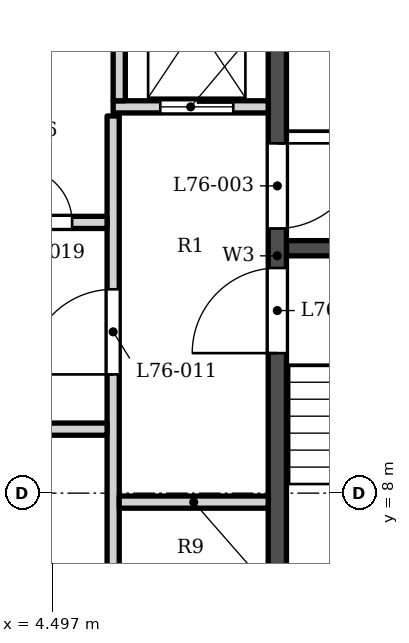
"""IFC4 building model, lengths in metres.
Left out: names, types, materials, properties, quantities, classifications, styles, units other than length and angle.
Written with IfcOpenShell. Run it as: python <this file> out.ifc"""

import sys

from ifc_helpers import new_model, si_unit, direction, frame, frame_2d, origin, place, context, subcontext, project, spatial, rectangle, extrude, element, fill, save


model = new_model("IFC4")
c1 = context("Model", 3, precision=1e-05, world=origin(), true_north=direction((0.0, 1.0)))
c2 = subcontext(c1, "Body", "Model", "MODEL_VIEW")
j1 = project(units=[si_unit("LENGTHUNIT", "METRE"), si_unit("PLANEANGLEUNIT", "RADIAN")], contexts=[c1])
p1 = place(None, origin())
s1 = spatial("IfcSite", under=j1, at=p1, CompositionType="ELEMENT")
p2 = place(p1, origin())
s2 = spatial("IfcBuilding", under=s1, at=p2, CompositionType="ELEMENT")
p3 = place(p2, frame((0.0, 0.0, 325.5)))
s3 = spatial("IfcBuildingStorey", under=s2, at=p3, CompositionType="ELEMENT", Elevation=325.5)
p4 = place(p3, frame((8.2, 5.253, 0.0), z_axis=(0.0, 0.0, 1.0), x_axis=(0.0, 1.0, 0.0)))
e1 = element("IfcWall", 1, at=p4, inside=s3, PredefinedType="SHEAR", context=c2, shape_type="SweptSolid", body=[
    extrude(rectangle(XDim=13.3, YDim=0.3, at=frame_2d((6.65, 0.0))), origin(), (0.0, 0.0, 1.0), 5.0),
])
p5 = place(p4, frame((7.1, 0.0, 0.0)))
e2 = element("IfcOpeningElement", 2, at=p5, cuts=e1, PredefinedType="OPENING", context=c2, shape_type="SweptSolid", body=[
    extrude(rectangle(XDim=1.4, YDim=2.1, at=frame_2d((0.7, 1.05))), frame((0.0, 0.16, 0.0), z_axis=(0.0, -1.0, 0.0), x_axis=(1.0, 0.0, 0.0)), (0.0, 0.0, 1.0), 0.32),
])
p6 = place(p4, frame((5.05, 0.0, 0.0)))
e3 = element("IfcOpeningElement", 3, at=p6, cuts=e1, PredefinedType="OPENING", context=c2, shape_type="SweptSolid", body=[
    extrude(rectangle(XDim=1.4, YDim=2.1, at=frame_2d((0.7, 1.05))), frame((0.0, 0.16, 0.0), z_axis=(0.0, -1.0, 0.0), x_axis=(1.0, 0.0, 0.0)), (0.0, 0.0, 1.0), 0.32),
])
p7 = place(p3, frame((8.35, 12.028, 0.0), z_axis=(0.0, 0.0, 1.0), x_axis=(1.0, 0.0, 0.0)))
e4 = element("IfcWall", 4, at=p7, inside=s3, PredefinedType="SHEAR", context=c2, shape_type="SweptSolid", body=[
    extrude(rectangle(XDim=3.75, YDim=0.25, at=frame_2d((1.875, 0.0))), origin(), (0.0, 0.0, 1.0), 5.0),
])
p8 = place(p3, frame((5.5, 6.353, 0.0), z_axis=(0.0, 0.0, 1.0), x_axis=(0.0, 1.0, 0.0)))
e5 = element("IfcWall", 5, at=p8, inside=s3, PredefinedType="SOLIDWALL", context=c2, shape_type="SweptSolid", body=[
    extrude(rectangle(XDim=7.85, YDim=0.2, at=frame_2d((3.925, 0.0))), origin(), (0.0, 0.0, 1.0), 4.8),
])
p9 = place(p8, frame((3.6, 0.0, 0.0)))
e6 = element("IfcOpeningElement", 6, at=p9, cuts=e5, PredefinedType="OPENING", context=c2, shape_type="SweptSolid", body=[
    extrude(rectangle(XDim=1.4, YDim=2.1, at=frame_2d((0.7, 1.05))), frame((0.0, 0.11, 0.0), z_axis=(0.0, -1.0, 0.0), x_axis=(1.0, 0.0, 0.0)), (0.0, 0.0, 1.0), 0.22),
])
p10 = place(p3, frame((5.6, 7.853, 0.0), z_axis=(0.0, 0.0, 1.0), x_axis=(1.0, 0.0, 0.0)))
e7 = element("IfcWall", 7, at=p10, inside=s3, PredefinedType="SOLIDWALL", context=c2, shape_type="SweptSolid", body=[
    extrude(rectangle(XDim=2.45, YDim=0.2, at=frame_2d((1.225, 0.0))), origin(), (0.0, 0.0, 1.0), 4.8),
])
p11 = place(p3, frame((1.1, 9.052, 0.0), z_axis=(0.0, 0.0, 1.0), x_axis=(1.0, 0.0, 0.0)))
e8 = element("IfcWall", 8, at=p11, inside=s3, PredefinedType="PARTITIONING", context=c2, shape_type="SweptSolid", body=[
    extrude(rectangle(XDim=4.3, YDim=0.2, at=frame_2d((2.15, 0.0))), origin(), (0.0, 0.0, 1.0), 4.8),
])
p12 = place(p11, frame((1.7, 0.0, 0.0)))
e9 = element("IfcOpeningElement", 9, at=p12, cuts=e8, PredefinedType="OPENING", context=c2, shape_type="SweptSolid", body=[
    extrude(rectangle(XDim=0.9, YDim=2.1, at=frame_2d((0.45, 1.05))), frame((0.0, 0.11, 0.0), z_axis=(0.0, -1.0, 0.0), x_axis=(1.0, 0.0, 0.0)), (0.0, 0.0, 1.0), 0.22),
])
p13 = place(p3, frame((3.35, 12.453, 0.0), z_axis=(0.0, 0.0, 1.0), x_axis=(1.0, 0.0, 0.0)))
e10 = element("IfcWall", 10, at=p13, inside=s3, PredefinedType="PARTITIONING", context=c2, shape_type="SweptSolid", body=[
    extrude(rectangle(XDim=2.05, YDim=0.2, at=frame_2d((1.025, 0.0))), origin(), (0.0, 0.0, 1.0), 4.8),
])
p14 = place(p13, frame((0.575, 0.0, 0.0)))
e11 = element("IfcOpeningElement", 11, at=p14, cuts=e10, PredefinedType="OPENING", context=c2, shape_type="SweptSolid", body=[
    extrude(rectangle(XDim=0.9, YDim=2.1, at=frame_2d((0.45, 1.05))), frame((0.0, 0.11, 0.0), z_axis=(0.0, -1.0, 0.0), x_axis=(1.0, 0.0, 0.0)), (0.0, 0.0, 1.0), 0.22),
])
p15 = place(p3, frame((5.5, 14.353, 0.0), z_axis=(0.0, 0.0, 1.0), x_axis=(1.0, 0.0, 0.0)))
e12 = element("IfcWall", 12, at=p15, inside=s3, PredefinedType="SOLIDWALL", context=c2, shape_type="SweptSolid", body=[
    extrude(rectangle(XDim=2.55, YDim=0.2, at=frame_2d((1.275, 0.0))), origin(), (0.0, 0.0, 1.0), 4.8),
])
p16 = place(p15, frame((0.775, 0.0, 0.0)))
e13 = element("IfcOpeningElement", 13, at=p16, cuts=e12, PredefinedType="OPENING", context=c2, shape_type="SweptSolid", body=[
    extrude(rectangle(XDim=1.2, YDim=2.1, at=frame_2d((0.6, 1.05))), frame((0.0, 0.11, 0.0), z_axis=(0.0, -1.0, 0.0), x_axis=(1.0, 0.0, 0.0)), (0.0, 0.0, 1.0), 0.22),
])
p17 = place(p3, frame((5.6, 14.453, 0.0), z_axis=(0.0, 0.0, 1.0), x_axis=(0.0, 1.0, 0.0)))
e14 = element("IfcWall", 14, at=p17, inside=s3, PredefinedType="SOLIDWALL", context=c2, shape_type="SweptSolid", body=[
    extrude(rectangle(XDim=3.9, YDim=0.2, at=frame_2d((1.95, 0.0))), origin(), (0.0, 0.0, 1.0), 4.8),
])
p18 = place(p16, origin())
e15 = element("IfcDoor", 15, at=p18, inside=s3, OperationType="DOUBLE_DOOR_SLIDING", PredefinedType="DOOR", context=c2, shape_type="SweptSolid", body=[
    extrude(rectangle(XDim=1.2, YDim=2.1, at=frame_2d((0.6, 1.05))), frame((0.0, 0.025, 0.0), z_axis=(0.0, -1.0, 0.0), x_axis=(1.0, 0.0, 0.0)), (0.0, 0.0, 1.0), 0.05),
])
fill(e13, e15)
p19 = place(p5, origin())
e16 = element("IfcDoor", 16, at=p19, inside=s3, OperationType="SINGLE_SWING_RIGHT", PredefinedType="DOOR", context=c2, shape_type="SweptSolid", body=[
    extrude(rectangle(XDim=1.4, YDim=2.1, at=frame_2d((0.7, 1.05))), frame((0.0, 0.025, 0.0), z_axis=(0.0, -1.0, 0.0), x_axis=(1.0, 0.0, 0.0)), (0.0, 0.0, 1.0), 0.05),
])
fill(e2, e16)
p20 = place(p6, origin())
e17 = element("IfcDoor", 17, at=p20, inside=s3, OperationType="SINGLE_SWING_LEFT", PredefinedType="DOOR", context=c2, shape_type="SweptSolid", body=[
    extrude(rectangle(XDim=1.4, YDim=2.1, at=frame_2d((0.7, 1.05))), frame((0.0, 0.025, 0.0), z_axis=(0.0, -1.0, 0.0), x_axis=(1.0, 0.0, 0.0)), (0.0, 0.0, 1.0), 0.05),
])
fill(e3, e17)
p21 = place(p9, origin())
e18 = element("IfcDoor", 18, at=p21, inside=s3, OperationType="SINGLE_SWING_LEFT", PredefinedType="DOOR", context=c2, shape_type="SweptSolid", body=[
    extrude(rectangle(XDim=1.4, YDim=2.1, at=frame_2d((0.7, 1.05))), frame((0.0, 0.025, 0.0), z_axis=(0.0, -1.0, 0.0), x_axis=(1.0, 0.0, 0.0)), (0.0, 0.0, 1.0), 0.05),
])
fill(e6, e18)
p22 = place(p14, origin())
e19 = element("IfcDoor", 19, at=p22, inside=s3, OperationType="SINGLE_SWING_LEFT", PredefinedType="DOOR", context=c2, shape_type="SweptSolid", body=[
    extrude(rectangle(XDim=0.9, YDim=2.1, at=frame_2d((0.45, 1.05))), frame((0.0, 0.025, 0.0), z_axis=(0.0, -1.0, 0.0), x_axis=(1.0, 0.0, 0.0)), (0.0, 0.0, 1.0), 0.05),
])
fill(e11, e19)
save(model, sys.argv[1])
